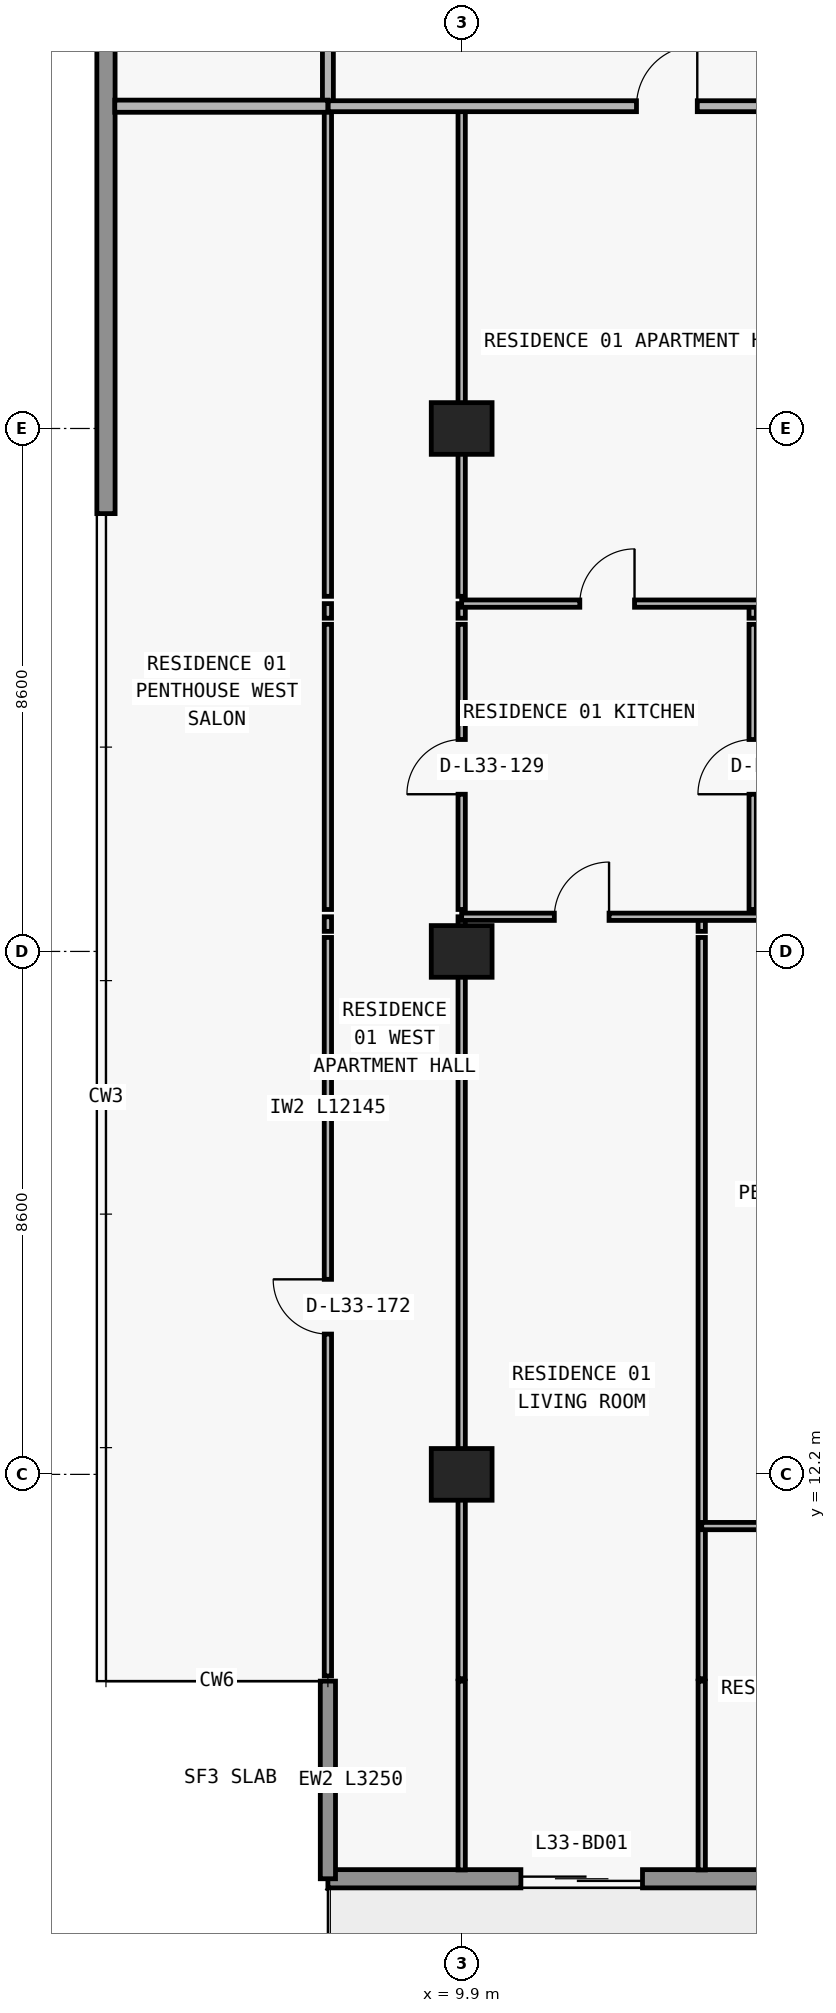
"""IFC4 building model, lengths in metres.
Left out: names, types, materials, properties, quantities, classifications, styles, units other than length and angle.
Written with IfcOpenShell. Run it as: python <this file> out.ifc"""

import sys

from ifc_helpers import new_model, si_unit, direction, frame, frame_2d, origin, origin_2d, place, context, subcontext, project, spatial, rectangle, extrude, element, fill, save


model = new_model("IFC4")
c1 = context("Model", 3, precision=1e-05, world=origin(), true_north=direction((0.0, 1.0)))
c2 = subcontext(c1, "Body", "Model", "MODEL_VIEW")
j1 = project(units=[si_unit("LENGTHUNIT", "METRE"), si_unit("PLANEANGLEUNIT", "RADIAN")], contexts=[c1])
p1 = place(None, origin())
s1 = spatial("IfcSite", under=j1, at=p1, CompositionType="ELEMENT")
p2 = place(p1, origin())
s2 = spatial("IfcBuilding", under=s1, at=p2, CompositionType="ELEMENT")
p3 = place(p2, frame((0.0, 0.0, 122.4)))
s3 = spatial("IfcBuildingStorey", under=s2, at=p3, CompositionType="ELEMENT", Elevation=122.4)
for number, where, z_axis, x_axis in (
    (1, (9.9, 12.2, 0.0), (0.0, 0.0, 1.0), (1.0, 0.0, 0.0)),
    (2, (9.9, 20.8, 0.0), (0.0, 0.0, 1.0), (1.0, 0.0, 0.0)),
    (3, (9.9, 29.4, 0.0), (0.0, 0.0, 1.0), (1.0, 0.0, 0.0)),
):
    element("IfcColumn", number, at=place(p3, frame(where, z_axis=z_axis, x_axis=x_axis)), inside=s3, PredefinedType="COLUMN", context=c2, shape_type="SweptSolid", body=[
        extrude(rectangle(XDim=1.0, YDim=0.85, at=origin_2d()), origin(), (0.0, 0.0, 1.0), 3.05),
    ])
p4 = place(p3, frame((70.1, 5.55, 0.0), z_axis=(0.0, 0.0, 1.0), x_axis=(-1.0, 0.0, 0.0)))
e4 = element("IfcWall", 4, at=p4, inside=s3, PredefinedType="STANDARD", context=c2, shape_type="SweptSolid", body=[
    extrude(rectangle(XDim=62.4, YDim=0.3, at=frame_2d((31.2, 0.0))), origin(), (0.0, 0.0, 1.0), 3.05),
])
p5 = place(p4, frame((57.226, 0.0, 0.0)))
e5 = element("IfcOpeningElement", 5, at=p5, cuts=e4, PredefinedType="OPENING", context=c2, shape_type="SweptSolid", body=[
    extrude(rectangle(XDim=2.0, YDim=2.3, at=frame_2d((1.0, 1.15))), frame((0.0, 0.16, 0.0), z_axis=(0.0, -1.0, 0.0), x_axis=(1.0, 0.0, 0.0)), (0.0, 0.0, 1.0), 0.32),
])
p6 = place(p4, frame((52.926, 0.0, 0.85)))
e6 = element("IfcOpeningElement", 6, at=p6, cuts=e4, PredefinedType="OPENING", context=c2, shape_type="SweptSolid", body=[
    extrude(rectangle(XDim=2.2, YDim=1.55, at=frame_2d((1.1, 0.775))), frame((0.0, 0.16, 0.0), z_axis=(0.0, -1.0, 0.0), x_axis=(1.0, 0.0, 0.0)), (0.0, 0.0, 1.0), 0.32),
])
p7 = place(p4, frame((48.49, 0.0, 0.0)))
e7 = element("IfcOpeningElement", 7, at=p7, cuts=e4, PredefinedType="OPENING", context=c2, shape_type="SweptSolid", body=[
    extrude(rectangle(XDim=2.0, YDim=2.3, at=frame_2d((1.0, 1.15))), frame((0.0, 0.16, 0.0), z_axis=(0.0, -1.0, 0.0), x_axis=(1.0, 0.0, 0.0)), (0.0, 0.0, 1.0), 0.32),
])
p8 = place(p4, frame((44.39, 0.0, 0.85)))
e8 = element("IfcOpeningElement", 8, at=p8, cuts=e4, PredefinedType="OPENING", context=c2, shape_type="SweptSolid", body=[
    extrude(rectangle(XDim=1.8, YDim=1.55, at=frame_2d((0.9, 0.775))), frame((0.0, 0.16, 0.0), z_axis=(0.0, -1.0, 0.0), x_axis=(1.0, 0.0, 0.0)), (0.0, 0.0, 1.0), 0.32),
])
p9 = place(p4, frame((40.426, 0.0, 0.0)))
e9 = element("IfcOpeningElement", 9, at=p9, cuts=e4, PredefinedType="OPENING", context=c2, shape_type="SweptSolid", body=[
    extrude(rectangle(XDim=2.0, YDim=2.3, at=frame_2d((1.0, 1.15))), frame((0.0, 0.16, 0.0), z_axis=(0.0, -1.0, 0.0), x_axis=(1.0, 0.0, 0.0)), (0.0, 0.0, 1.0), 0.32),
])
p10 = place(p4, frame((36.126, 0.0, 0.85)))
e10 = element("IfcOpeningElement", 10, at=p10, cuts=e4, PredefinedType="OPENING", context=c2, shape_type="SweptSolid", body=[
    extrude(rectangle(XDim=2.2, YDim=1.55, at=frame_2d((1.1, 0.775))), frame((0.0, 0.16, 0.0), z_axis=(0.0, -1.0, 0.0), x_axis=(1.0, 0.0, 0.0)), (0.0, 0.0, 1.0), 0.32),
])
p11 = place(p4, frame((31.91, 0.0, 0.0)))
e11 = element("IfcOpeningElement", 11, at=p11, cuts=e4, PredefinedType="OPENING", context=c2, shape_type="SweptSolid", body=[
    extrude(rectangle(XDim=2.0, YDim=2.3, at=frame_2d((1.0, 1.15))), frame((0.0, 0.16, 0.0), z_axis=(0.0, -1.0, 0.0), x_axis=(1.0, 0.0, 0.0)), (0.0, 0.0, 1.0), 0.32),
])
p12 = place(p4, frame((28.21, 0.0, 0.85)))
e12 = element("IfcOpeningElement", 12, at=p12, cuts=e4, PredefinedType="OPENING", context=c2, shape_type="SweptSolid", body=[
    extrude(rectangle(XDim=1.8, YDim=1.55, at=frame_2d((0.9, 0.775))), frame((0.0, 0.16, 0.0), z_axis=(0.0, -1.0, 0.0), x_axis=(1.0, 0.0, 0.0)), (0.0, 0.0, 1.0), 0.32),
])
p13 = place(p4, frame((24.426, 0.0, 0.0)))
e13 = element("IfcOpeningElement", 13, at=p13, cuts=e4, PredefinedType="OPENING", context=c2, shape_type="SweptSolid", body=[
    extrude(rectangle(XDim=2.0, YDim=2.3, at=frame_2d((1.0, 1.15))), frame((0.0, 0.16, 0.0), z_axis=(0.0, -1.0, 0.0), x_axis=(1.0, 0.0, 0.0)), (0.0, 0.0, 1.0), 0.32),
])
p14 = place(p4, frame((20.126, 0.0, 0.85)))
e14 = element("IfcOpeningElement", 14, at=p14, cuts=e4, PredefinedType="OPENING", context=c2, shape_type="SweptSolid", body=[
    extrude(rectangle(XDim=2.2, YDim=1.55, at=frame_2d((1.1, 0.775))), frame((0.0, 0.16, 0.0), z_axis=(0.0, -1.0, 0.0), x_axis=(1.0, 0.0, 0.0)), (0.0, 0.0, 1.0), 0.32),
])
p15 = place(p4, frame((15.69, 0.0, 0.0)))
e15 = element("IfcOpeningElement", 15, at=p15, cuts=e4, PredefinedType="OPENING", context=c2, shape_type="SweptSolid", body=[
    extrude(rectangle(XDim=2.0, YDim=2.3, at=frame_2d((1.0, 1.15))), frame((0.0, 0.16, 0.0), z_axis=(0.0, -1.0, 0.0), x_axis=(1.0, 0.0, 0.0)), (0.0, 0.0, 1.0), 0.32),
])
p16 = place(p4, frame((11.59, 0.0, 0.85)))
e16 = element("IfcOpeningElement", 16, at=p16, cuts=e4, PredefinedType="OPENING", context=c2, shape_type="SweptSolid", body=[
    extrude(rectangle(XDim=1.8, YDim=1.55, at=frame_2d((0.9, 0.775))), frame((0.0, 0.16, 0.0), z_axis=(0.0, -1.0, 0.0), x_axis=(1.0, 0.0, 0.0)), (0.0, 0.0, 1.0), 0.32),
])
p17 = place(p4, frame((7.626, 0.0, 0.0)))
e17 = element("IfcOpeningElement", 17, at=p17, cuts=e4, PredefinedType="OPENING", context=c2, shape_type="SweptSolid", body=[
    extrude(rectangle(XDim=2.0, YDim=2.3, at=frame_2d((1.0, 1.15))), frame((0.0, 0.16, 0.0), z_axis=(0.0, -1.0, 0.0), x_axis=(1.0, 0.0, 0.0)), (0.0, 0.0, 1.0), 0.32),
])
p18 = place(p4, frame((3.326, 0.0, 0.85)))
e18 = element("IfcOpeningElement", 18, at=p18, cuts=e4, PredefinedType="OPENING", context=c2, shape_type="SweptSolid", body=[
    extrude(rectangle(XDim=2.2, YDim=1.55, at=frame_2d((1.1, 0.775))), frame((0.0, 0.16, 0.0), z_axis=(0.0, -1.0, 0.0), x_axis=(1.0, 0.0, 0.0)), (0.0, 0.0, 1.0), 0.32),
])
p19 = place(p3, frame((7.7, 8.8, 0.0), z_axis=(0.0, 0.0, 1.0), x_axis=(0.0, -1.0, 0.0)))
e19 = element("IfcWall", 19, at=p19, inside=s3, PredefinedType="ELEMENTEDWALL", context=c2, shape_type="SweptSolid", body=[
    extrude(rectangle(XDim=3.25, YDim=0.25, at=frame_2d((1.625, 0.0))), origin(), (0.0, 0.0, 1.0), 3.05),
])
p20 = place(p3, frame((4.05, 28.0, 0.0), z_axis=(0.0, 0.0, 1.0), x_axis=(0.0, 1.0, 0.0)))
e20 = element("IfcWall", 20, at=p20, inside=s3, PredefinedType="STANDARD", context=c2, shape_type="SweptSolid", body=[
    extrude(rectangle(XDim=19.2, YDim=0.3, at=frame_2d((9.6, 0.0))), origin(), (0.0, 0.0, 1.0), 3.05),
])
p21 = place(p3, frame((7.7, 8.885, 0.0), z_axis=(0.0, 0.0, 1.0), x_axis=(0.0, 1.0, 0.0)))
e21 = element("IfcWall", 21, at=p21, inside=s3, PredefinedType="PARTITIONING", context=c2, shape_type="SweptSolid", body=[
    extrude(rectangle(XDim=12.145, YDim=0.12, at=frame_2d((6.073, 0.0))), origin(), (0.0, 0.0, 1.0), 3.05),
])
p22 = place(p21, frame((5.623, 0.0, 0.0)))
e22 = element("IfcOpeningElement", 22, at=p22, cuts=e21, PredefinedType="OPENING", context=c2, shape_type="SweptSolid", body=[
    extrude(rectangle(XDim=0.9, YDim=2.15, at=frame_2d((0.45, 1.075))), frame((0.0, 0.07, 0.0), z_axis=(0.0, -1.0, 0.0), x_axis=(1.0, 0.0, 0.0)), (0.0, 0.0, 1.0), 0.14),
])
p23 = place(p3, frame((7.7, 21.13, 0.0), z_axis=(0.0, 0.0, 1.0), x_axis=(0.0, 1.0, 0.0)))
e23 = element("IfcWall", 23, at=p23, inside=s3, PredefinedType="PARTITIONING", context=c2, shape_type="SweptSolid", body=[
    extrude(rectangle(XDim=0.24, YDim=0.12, at=frame_2d((0.12, 0.0))), origin(), (0.0, 0.0, 1.0), 3.05),
])
p24 = place(p3, frame((7.7, 21.49, 0.0), z_axis=(0.0, 0.0, 1.0), x_axis=(0.0, 1.0, 0.0)))
e24 = element("IfcWall", 24, at=p24, inside=s3, PredefinedType="PARTITIONING", context=c2, shape_type="SweptSolid", body=[
    extrude(rectangle(XDim=4.69, YDim=0.12, at=frame_2d((2.345, 0.0))), origin(), (0.0, 0.0, 1.0), 3.05),
])
p25 = place(p3, frame((7.7, 26.28, 0.0), z_axis=(0.0, 0.0, 1.0), x_axis=(0.0, 1.0, 0.0)))
e25 = element("IfcWall", 25, at=p25, inside=s3, PredefinedType="PARTITIONING", context=c2, shape_type="SweptSolid", body=[
    extrude(rectangle(XDim=0.24, YDim=0.12, at=frame_2d((0.12, 0.0))), origin(), (0.0, 0.0, 1.0), 3.05),
])
p26 = place(p3, frame((7.7, 26.64, 0.0), z_axis=(0.0, 0.0, 1.0), x_axis=(0.0, 1.0, 0.0)))
e26 = element("IfcWall", 26, at=p26, inside=s3, PredefinedType="PARTITIONING", context=c2, shape_type="SweptSolid", body=[
    extrude(rectangle(XDim=8.06, YDim=0.12, at=frame_2d((4.03, 0.0))), origin(), (0.0, 0.0, 1.0), 3.05),
])
p27 = place(p3, frame((7.7, 34.705, 0.0), z_axis=(0.0, 0.0, 1.0), x_axis=(0.0, 1.0, 0.0)))
e27 = element("IfcWall", 27, at=p27, inside=s3, PredefinedType="PARTITIONING", context=c2, shape_type="SweptSolid", body=[
    extrude(rectangle(XDim=2.245, YDim=0.18, at=frame_2d((1.123, 0.0))), origin(), (0.0, 0.0, 1.0), 3.05),
])
p28 = place(p3, frame((9.9, 5.695, 0.0), z_axis=(0.0, 0.0, 1.0), x_axis=(0.0, 1.0, 0.0)))
e28 = element("IfcWall", 28, at=p28, inside=s3, PredefinedType="PARTITIONING", context=c2, shape_type="SweptSolid", body=[
    extrude(rectangle(XDim=3.105, YDim=0.12, at=frame_2d((1.552, 0.0))), origin(), (0.0, 0.0, 1.0), 3.05),
])
p29 = place(p3, frame((9.9, 8.84, 0.0), z_axis=(0.0, 0.0, 1.0), x_axis=(0.0, 1.0, 0.0)))
e29 = element("IfcWall", 29, at=p29, inside=s3, PredefinedType="PARTITIONING", context=c2, shape_type="SweptSolid", body=[
    extrude(rectangle(XDim=12.19, YDim=0.12, at=frame_2d((6.095, 0.0))), origin(), (0.0, 0.0, 1.0), 2.174),
])
p30 = place(p3, frame((9.9, 21.13, 0.0), z_axis=(0.0, 0.0, 1.0), x_axis=(0.0, 1.0, 0.0)))
e30 = element("IfcWall", 30, at=p30, inside=s3, PredefinedType="PARTITIONING", context=c2, shape_type="SweptSolid", body=[
    extrude(rectangle(XDim=0.24, YDim=0.12, at=frame_2d((0.12, 0.0))), origin(), (0.0, 0.0, 1.0), 2.174),
])
p31 = place(p3, frame((9.9, 21.49, 0.0), z_axis=(0.0, 0.0, 1.0), x_axis=(0.0, 1.0, 0.0)))
e31 = element("IfcWall", 31, at=p31, inside=s3, PredefinedType="PARTITIONING", context=c2, shape_type="SweptSolid", body=[
    extrude(rectangle(XDim=4.69, YDim=0.12, at=frame_2d((2.345, 0.0))), origin(), (0.0, 0.0, 1.0), 2.174),
])
p32 = place(p31, frame((1.895, 0.0, 0.0)))
e32 = element("IfcOpeningElement", 32, at=p32, cuts=e31, PredefinedType="OPENING", context=c2, shape_type="SweptSolid", body=[
    extrude(rectangle(XDim=0.9, YDim=2.124, at=frame_2d((0.45, 1.062))), frame((0.0, 0.07, 0.0), z_axis=(0.0, -1.0, 0.0), x_axis=(1.0, 0.0, 0.0)), (0.0, 0.0, 1.0), 0.14),
])
p33 = place(p3, frame((9.9, 26.28, 0.0), z_axis=(0.0, 0.0, 1.0), x_axis=(0.0, 1.0, 0.0)))
e33 = element("IfcWall", 33, at=p33, inside=s3, PredefinedType="PARTITIONING", context=c2, shape_type="SweptSolid", body=[
    extrude(rectangle(XDim=0.24, YDim=0.12, at=frame_2d((0.12, 0.0))), origin(), (0.0, 0.0, 1.0), 2.174),
])
p34 = place(p3, frame((9.9, 26.64, 0.0), z_axis=(0.0, 0.0, 1.0), x_axis=(0.0, 1.0, 0.0)))
e34 = element("IfcWall", 34, at=p34, inside=s3, PredefinedType="PARTITIONING", context=c2, shape_type="SweptSolid", body=[
    extrude(rectangle(XDim=8.06, YDim=0.12, at=frame_2d((4.03, 0.0))), origin(), (0.0, 0.0, 1.0), 2.174),
])
p35 = place(p3, frame((13.848, 5.695, 0.0), z_axis=(0.0, 0.0, 1.0), x_axis=(0.0, 1.0, 0.0)))
e35 = element("IfcWall", 35, at=p35, inside=s3, PredefinedType="PARTITIONING", context=c2, shape_type="SweptSolid", body=[
    extrude(rectangle(XDim=3.105, YDim=0.12, at=frame_2d((1.552, 0.0))), origin(), (0.0, 0.0, 1.0), 3.05),
])
p36 = place(p3, frame((13.848, 8.84, 0.0), z_axis=(0.0, 0.0, 1.0), x_axis=(0.0, 1.0, 0.0)))
e36 = element("IfcWall", 36, at=p36, inside=s3, PredefinedType="PARTITIONING", context=c2, shape_type="SweptSolid", body=[
    extrude(rectangle(XDim=12.19, YDim=0.12, at=frame_2d((6.095, 0.0))), origin(), (0.0, 0.0, 1.0), 3.05),
])
p37 = place(p3, frame((13.848, 21.13, 0.0), z_axis=(0.0, 0.0, 1.0), x_axis=(0.0, 1.0, 0.0)))
e37 = element("IfcWall", 37, at=p37, inside=s3, PredefinedType="PARTITIONING", context=c2, shape_type="SweptSolid", body=[
    extrude(rectangle(XDim=0.24, YDim=0.12, at=frame_2d((0.12, 0.0))), origin(), (0.0, 0.0, 1.0), 3.05),
])
p38 = place(p3, frame((14.686, 21.49, 0.0), z_axis=(0.0, 0.0, 1.0), x_axis=(0.0, 1.0, 0.0)))
e38 = element("IfcWall", 38, at=p38, inside=s3, PredefinedType="PARTITIONING", context=c2, shape_type="SweptSolid", body=[
    extrude(rectangle(XDim=4.69, YDim=0.12, at=frame_2d((2.345, 0.0))), origin(), (0.0, 0.0, 1.0), 3.05),
])
p39 = place(p38, frame((1.895, 0.0, 0.0)))
e39 = element("IfcOpeningElement", 39, at=p39, cuts=e38, PredefinedType="OPENING", context=c2, shape_type="SweptSolid", body=[
    extrude(rectangle(XDim=0.9, YDim=2.15, at=frame_2d((0.45, 1.075))), frame((0.0, 0.07, 0.0), z_axis=(0.0, -1.0, 0.0), x_axis=(1.0, 0.0, 0.0)), (0.0, 0.0, 1.0), 0.14),
])
p40 = place(p3, frame((14.686, 26.28, 0.0), z_axis=(0.0, 0.0, 1.0), x_axis=(0.0, 1.0, 0.0)))
e40 = element("IfcWall", 40, at=p40, inside=s3, PredefinedType="PARTITIONING", context=c2, shape_type="SweptSolid", body=[
    extrude(rectangle(XDim=0.24, YDim=0.12, at=frame_2d((0.12, 0.0))), origin(), (0.0, 0.0, 1.0), 3.05),
])
p41 = place(p3, frame((13.848, 11.35, 0.0), z_axis=(0.0, 0.0, 1.0), x_axis=(1.0, 0.0, 0.0)))
e41 = element("IfcWall", 41, at=p41, inside=s3, PredefinedType="PARTITIONING", context=c2, shape_type="SweptSolid", body=[
    extrude(rectangle(XDim=4.402, YDim=0.12, at=frame_2d((2.201, 0.0))), origin(), (0.0, 0.0, 1.0), 3.05),
])
p42 = place(p41, frame((1.751, 0.0, 0.0)))
e42 = element("IfcOpeningElement", 42, at=p42, cuts=e41, PredefinedType="OPENING", context=c2, shape_type="SweptSolid", body=[
    extrude(rectangle(XDim=0.9, YDim=2.15, at=frame_2d((0.45, 1.075))), frame((0.0, 0.07, 0.0), z_axis=(0.0, -1.0, 0.0), x_axis=(1.0, 0.0, 0.0)), (0.0, 0.0, 1.0), 0.14),
])
p43 = place(p3, frame((9.9, 21.37, 0.0), z_axis=(0.0, 0.0, 1.0), x_axis=(1.0, 0.0, 0.0)))
e43 = element("IfcWall", 43, at=p43, inside=s3, PredefinedType="PARTITIONING", context=c2, shape_type="SweptSolid", body=[
    extrude(rectangle(XDim=8.35, YDim=0.12, at=frame_2d((4.175, 0.0))), origin(), (0.0, 0.0, 1.0), 3.05),
])
p44 = place(p43, frame((1.524, 0.0, 0.0)))
e44 = element("IfcOpeningElement", 44, at=p44, cuts=e43, PredefinedType="OPENING", context=c2, shape_type="SweptSolid", body=[
    extrude(rectangle(XDim=0.9, YDim=2.15, at=frame_2d((0.45, 1.075))), frame((0.0, 0.07, 0.0), z_axis=(0.0, -1.0, 0.0), x_axis=(1.0, 0.0, 0.0)), (0.0, 0.0, 1.0), 0.14),
])
p45 = place(p43, frame((6.118, 0.0, 0.0)))
e45 = element("IfcOpeningElement", 45, at=p45, cuts=e43, PredefinedType="OPENING", context=c2, shape_type="SweptSolid", body=[
    extrude(rectangle(XDim=0.9, YDim=2.15, at=frame_2d((0.45, 1.075))), frame((0.0, 0.07, 0.0), z_axis=(0.0, -1.0, 0.0), x_axis=(1.0, 0.0, 0.0)), (0.0, 0.0, 1.0), 0.14),
])
p46 = place(p3, frame((9.9, 26.52, 0.0), z_axis=(0.0, 0.0, 1.0), x_axis=(1.0, 0.0, 0.0)))
e46 = element("IfcWall", 46, at=p46, inside=s3, PredefinedType="PARTITIONING", context=c2, shape_type="SweptSolid", body=[
    extrude(rectangle(XDim=8.35, YDim=0.12, at=frame_2d((4.175, 0.0))), origin(), (0.0, 0.0, 1.0), 3.05),
])
p47 = place(p46, frame((1.943, 0.0, 0.0)))
e47 = element("IfcOpeningElement", 47, at=p47, cuts=e46, PredefinedType="OPENING", context=c2, shape_type="SweptSolid", body=[
    extrude(rectangle(XDim=0.9, YDim=2.15, at=frame_2d((0.45, 1.075))), frame((0.0, 0.07, 0.0), z_axis=(0.0, -1.0, 0.0), x_axis=(1.0, 0.0, 0.0)), (0.0, 0.0, 1.0), 0.14),
])
p48 = place(p3, frame((4.195, 34.7, 0.0), z_axis=(0.0, 0.0, 1.0), x_axis=(1.0, 0.0, 0.0)))
e48 = element("IfcWall", 48, at=p48, inside=s3, PredefinedType="PARTITIONING", context=c2, shape_type="SweptSolid", body=[
    extrude(rectangle(XDim=3.505, YDim=0.2, at=frame_2d((1.752, 0.0))), origin(), (0.0, 0.0, 1.0), 3.05),
])
p49 = place(p3, frame((7.705, 34.7, 0.0), z_axis=(0.0, 0.0, 1.0), x_axis=(1.0, 0.0, 0.0)))
e49 = element("IfcWall", 49, at=p49, inside=s3, PredefinedType="PARTITIONING", context=c2, shape_type="SweptSolid", body=[
    extrude(rectangle(XDim=10.545, YDim=0.18, at=frame_2d((5.272, 0.0))), origin(), (0.0, 0.0, 1.0), 3.05),
])
p50 = place(p49, frame((5.07, 0.0, 0.0)))
e50 = element("IfcOpeningElement", 50, at=p50, cuts=e49, PredefinedType="OPENING", context=c2, shape_type="SweptSolid", body=[
    extrude(rectangle(XDim=1.0, YDim=2.2, at=frame_2d((0.5, 1.1))), frame((0.0, 0.1, 0.0), z_axis=(0.0, -1.0, 0.0), x_axis=(1.0, 0.0, 0.0)), (0.0, 0.0, 1.0), 0.2),
])
p51 = place(p5, origin())
e51 = element("IfcDoor", 51, at=p51, inside=s3, OperationType="DOUBLE_DOOR_SLIDING", PredefinedType="DOOR", context=c2, shape_type="SweptSolid", body=[
    extrude(rectangle(XDim=2.0, YDim=2.3, at=frame_2d((1.0, 1.15))), frame((0.0, 0.025, 0.0), z_axis=(0.0, -1.0, 0.0), x_axis=(1.0, 0.0, 0.0)), (0.0, 0.0, 1.0), 0.05),
])
fill(e5, e51)
p52 = place(p50, origin())
e52 = element("IfcDoor", 52, at=p52, inside=s3, OperationType="SINGLE_SWING_RIGHT", PredefinedType="DOOR", context=c2, shape_type="SweptSolid", body=[
    extrude(rectangle(XDim=1.0, YDim=2.2, at=frame_2d((0.5, 1.1))), frame((0.0, 0.025, 0.0), z_axis=(0.0, -1.0, 0.0), x_axis=(1.0, 0.0, 0.0)), (0.0, 0.0, 1.0), 0.05),
])
fill(e50, e52)
p53 = place(p47, origin())
e53 = element("IfcDoor", 53, at=p53, inside=s3, OperationType="SINGLE_SWING_RIGHT", PredefinedType="DOOR", context=c2, shape_type="SweptSolid", body=[
    extrude(rectangle(XDim=0.9, YDim=2.15, at=frame_2d((0.45, 1.075))), frame((0.0, 0.025, 0.0), z_axis=(0.0, -1.0, 0.0), x_axis=(1.0, 0.0, 0.0)), (0.0, 0.0, 1.0), 0.05),
])
fill(e47, e53)
p54 = place(p39, origin())
e54 = element("IfcDoor", 54, at=p54, inside=s3, OperationType="SINGLE_SWING_LEFT", PredefinedType="DOOR", context=c2, shape_type="SweptSolid", body=[
    extrude(rectangle(XDim=0.9, YDim=2.15, at=frame_2d((0.45, 1.075))), frame((0.0, 0.025, 0.0), z_axis=(0.0, -1.0, 0.0), x_axis=(1.0, 0.0, 0.0)), (0.0, 0.0, 1.0), 0.05),
])
fill(e39, e54)
p55 = place(p44, origin())
e55 = element("IfcDoor", 55, at=p55, inside=s3, OperationType="SINGLE_SWING_RIGHT", PredefinedType="DOOR", context=c2, shape_type="SweptSolid", body=[
    extrude(rectangle(XDim=0.9, YDim=2.15, at=frame_2d((0.45, 1.075))), frame((0.0, 0.025, 0.0), z_axis=(0.0, -1.0, 0.0), x_axis=(1.0, 0.0, 0.0)), (0.0, 0.0, 1.0), 0.05),
])
fill(e44, e55)
p56 = place(p32, origin())
e56 = element("IfcDoor", 56, at=p56, inside=s3, OperationType="SINGLE_SWING_LEFT", PredefinedType="DOOR", context=c2, shape_type="SweptSolid", body=[
    extrude(rectangle(XDim=0.9, YDim=2.124, at=frame_2d((0.45, 1.062))), frame((0.0, 0.025, 0.0), z_axis=(0.0, -1.0, 0.0), x_axis=(1.0, 0.0, 0.0)), (0.0, 0.0, 1.0), 0.05),
])
fill(e32, e56)
p57 = place(p22, origin())
e57 = element("IfcDoor", 57, at=p57, inside=s3, OperationType="SINGLE_SWING_RIGHT", PredefinedType="DOOR", context=c2, shape_type="SweptSolid", body=[
    extrude(rectangle(XDim=0.9, YDim=2.15, at=frame_2d((0.45, 1.075))), frame((0.0, 0.025, 0.0), z_axis=(0.0, -1.0, 0.0), x_axis=(1.0, 0.0, 0.0)), (0.0, 0.0, 1.0), 0.05),
])
fill(e22, e57)
save(model, sys.argv[1])
